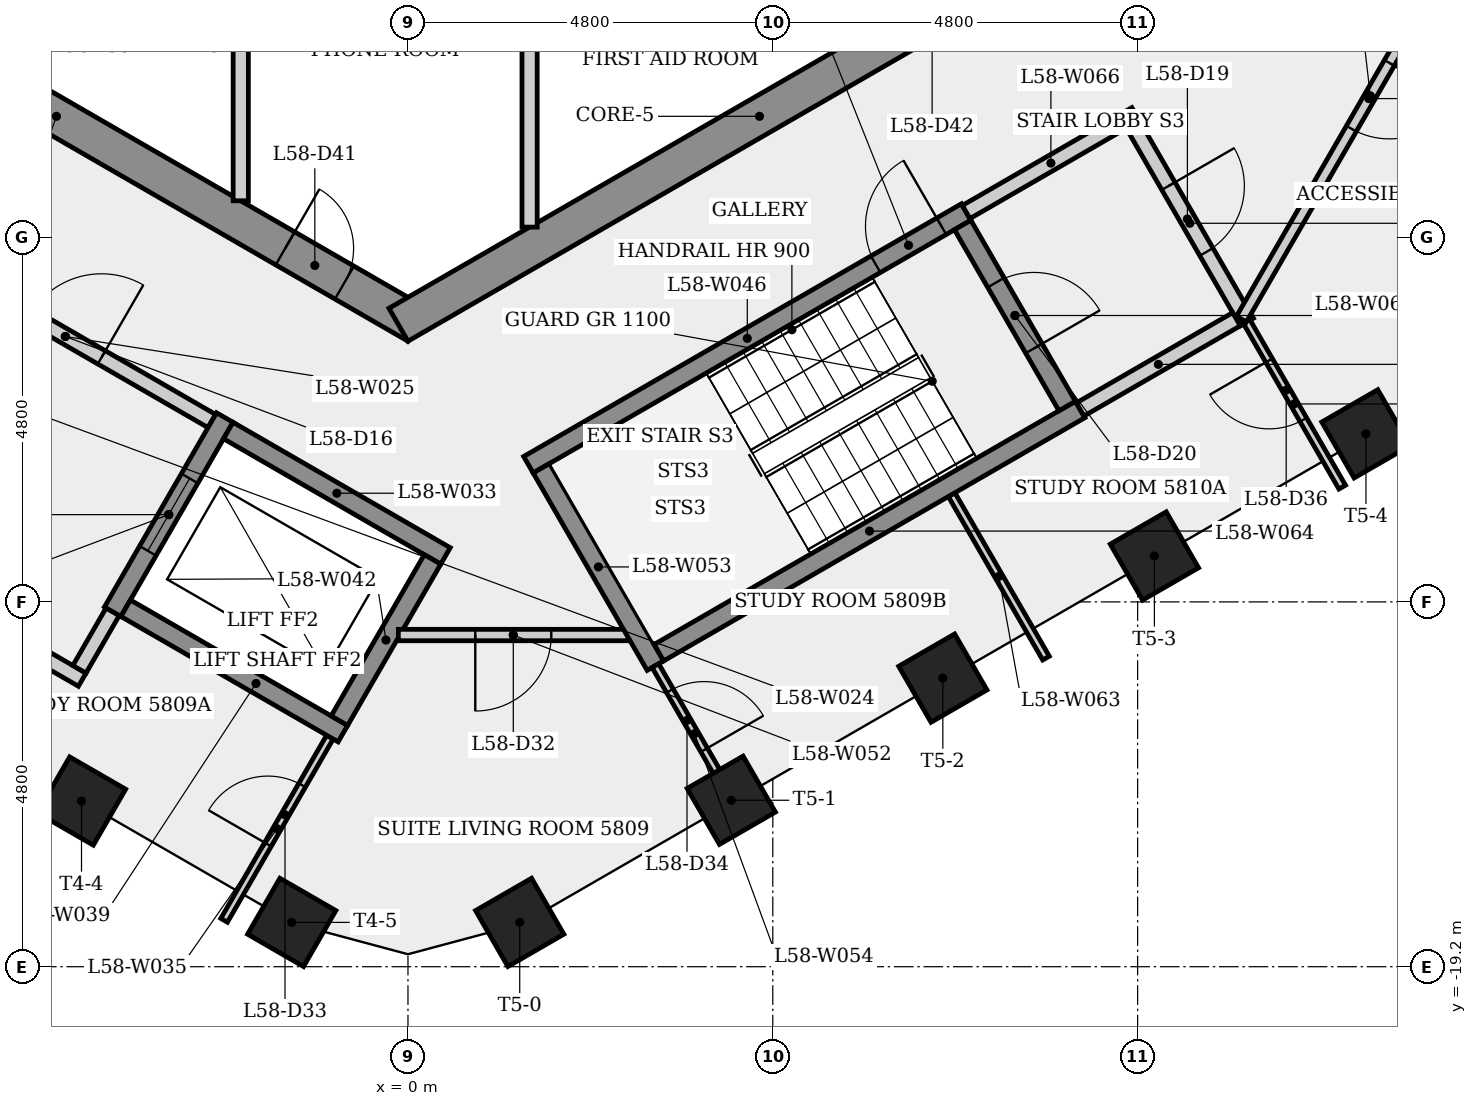
"""IFC4 building model, lengths in metres.
Left out: names, types, materials, properties, quantities, classifications, styles, units other than length and angle.
Written with IfcOpenShell. Run it as: python <this file> out.ifc"""

import sys

from ifc_helpers import new_model, si_unit, direction, frame, frame_2d, origin, origin_2d, place, context, subcontext, project, spatial, rectangle, extrude, element, fill, save


model = new_model("IFC4")
c1 = context("Model", 3, precision=1e-05, world=origin(), true_north=direction((0.0, 1.0)))
c2 = subcontext(c1, "Body", "Model", "MODEL_VIEW")
j1 = project(units=[si_unit("LENGTHUNIT", "METRE"), si_unit("PLANEANGLEUNIT", "RADIAN")], contexts=[c1])
p1 = place(None, origin())
s1 = spatial("IfcSite", under=j1, at=p1, CompositionType="ELEMENT")
p2 = place(p1, origin())
s2 = spatial("IfcBuilding", under=s1, at=p2, CompositionType="ELEMENT")
p3 = place(p2, frame((0.0, 0.0, 218.9)))
s3 = spatial("IfcBuildingStorey", under=s2, at=p3, CompositionType="ELEMENT", Elevation=218.9)
p4 = place(p3, frame((-9.375, -5.268, 0.0), z_axis=(0.0, 0.0, 1.0), x_axis=(0.866023993627, -0.500002442456, 0.0)))
e1 = element("IfcWall", 1, at=p4, inside=s3, PredefinedType="SHEAR", context=c2, shape_type="SweptSolid", body=[
    extrude(rectangle(XDim=10.97, YDim=0.5, at=frame_2d((5.485, 0.0))), origin(), (0.0, 0.0, 1.0), 3.4),
])
p5 = place(p4, frame((3.765, 0.0, 0.0)))
e2 = element("IfcOpeningElement", 2, at=p5, cuts=e1, PredefinedType="OPENING", context=c2, shape_type="SweptSolid", body=[
    extrude(rectangle(XDim=0.9, YDim=2.1, at=frame_2d((0.45, 1.05))), frame((0.0, 0.26, 0.0), z_axis=(0.0, -1.0, 0.0), x_axis=(1.0, 0.0, 0.0)), (0.0, 0.0, 1.0), 0.52),
])
p6 = place(p4, frame((8.96, 0.0, 0.0)))
e3 = element("IfcOpeningElement", 3, at=p6, cuts=e1, PredefinedType="OPENING", context=c2, shape_type="SweptSolid", body=[
    extrude(rectangle(XDim=0.9, YDim=2.1, at=frame_2d((0.45, 1.05))), frame((0.0, 0.26, 0.0), z_axis=(0.0, -1.0, 0.0), x_axis=(1.0, 0.0, 0.0)), (0.0, 0.0, 1.0), 0.52),
])
p7 = place(p3, frame((-0.125, -10.753, 0.0), z_axis=(0.0, 0.0, 1.0), x_axis=(0.866023993627, 0.500002442456, 0.0)))
e4 = element("IfcWall", 4, at=p7, inside=s3, PredefinedType="SHEAR", context=c2, shape_type="SweptSolid", body=[
    extrude(rectangle(XDim=10.97, YDim=0.5, at=frame_2d((5.485, 0.0))), origin(), (0.0, 0.0, 1.0), 3.4),
])
p8 = place(p7, frame((7.657, 0.0, 0.0)))
e5 = element("IfcOpeningElement", 5, at=p8, cuts=e4, PredefinedType="OPENING", context=c2, shape_type="SweptSolid", body=[
    extrude(rectangle(XDim=0.9, YDim=2.1, at=frame_2d((0.45, 1.05))), frame((0.0, 0.26, 0.0), z_axis=(0.0, -1.0, 0.0), x_axis=(1.0, 0.0, 0.0)), (0.0, 0.0, 1.0), 0.52),
])
for number, where, z_axis, x_axis in (
    (6, (-4.295, -17.02, 0.0), (0.0, 0.0, 1.0), (-0.5, -0.866, 0.0)),
    (7, (-1.53, -18.617, 0.0), (0.0, 0.0, 1.0), (-0.5, -0.866, 0.0)),
    (8, (1.47, -18.617, 0.0), (0.0, 0.0, 1.0), (0.5, -0.866, 0.0)),
    (9, (4.254, -17.01, 0.0), (0.0, 0.0, 1.0), (0.5, -0.866, 0.0)),
    (10, (7.037, -15.403, 0.0), (0.0, 0.0, 1.0), (0.5, -0.866, 0.0)),
    (11, (9.821, -13.796, 0.0), (0.0, 0.0, 1.0), (0.5, -0.866, 0.0)),
    (12, (12.604, -12.189, 0.0), (0.0, 0.0, 1.0), (0.5, -0.866, 0.0)),
):
    element("IfcColumn", number, at=place(p3, frame(where, z_axis=z_axis, x_axis=x_axis)), inside=s3, PredefinedType="COLUMN", context=c2, shape_type="SweptSolid", body=[
        extrude(rectangle(XDim=0.85, YDim=0.85, at=origin_2d()), origin(), (0.0, 0.0, 1.0), 3.4),
    ])
p9 = place(p3, frame((-8.356, -13.073, 0.0), z_axis=(0.0, 0.0, 1.0), x_axis=(0.866038532462, -0.499977259774, 0.0)))
e13 = element("IfcWall", 13, at=p9, inside=s3, PredefinedType="PARTITIONING", context=c2, shape_type="SweptSolid", body=[
    extrude(rectangle(XDim=4.7, YDim=0.2, at=frame_2d((2.35, 0.0))), origin(), (0.0, 0.0, 1.0), 3.05),
])
p10 = place(p3, frame((-6.435, -9.795, 0.0), z_axis=(0.0, 0.0, 1.0), x_axis=(0.866012907634, -0.500021643343, 0.0)))
e14 = element("IfcWall", 14, at=p10, inside=s3, PredefinedType="PARTITIONING", context=c2, shape_type="SweptSolid", body=[
    extrude(rectangle(XDim=4.45, YDim=0.2, at=frame_2d((2.225, 0.0))), origin(), (0.0, 0.0, 1.0), 3.05),
])
p11 = place(p10, frame((1.675, 0.0, 0.0)))
e15 = element("IfcOpeningElement", 15, at=p11, cuts=e14, PredefinedType="OPENING", context=c2, shape_type="SweptSolid", body=[
    extrude(rectangle(XDim=1.1, YDim=2.1, at=frame_2d((0.55, 1.05))), frame((0.0, 0.11, 0.0), z_axis=(0.0, -1.0, 0.0), x_axis=(1.0, 0.0, 0.0)), (0.0, 0.0, 1.0), 0.22),
])
p12 = place(p3, frame((-3.885, -14.529, 0.0), z_axis=(0.0, 0.0, 1.0), x_axis=(-0.499859285417, -0.866106630146, 0.0)))
e16 = element("IfcWall", 16, at=p12, inside=s3, PredefinedType="PARTITIONING", context=c2, shape_type="SweptSolid", body=[
    extrude(rectangle(XDim=0.875, YDim=0.2, at=frame_2d((0.438, 0.0))), origin(), (0.0, 0.0, 1.0), 3.05),
])
p13 = place(p3, frame((-2.41, -11.974, 0.0), z_axis=(0.0, 0.0, 1.0), x_axis=(-0.500001826776, -0.866024349092, 0.0)))
e17 = element("IfcWall", 17, at=p13, inside=s3, PredefinedType="SHEAR", context=c2, shape_type="SweptSolid", body=[
    extrude(rectangle(XDim=2.95, YDim=0.25, at=frame_2d((1.475, 0.0))), origin(), (0.0, 0.0, 1.0), 3.05),
])
p14 = place(p13, frame((0.925, 0.0, 0.0)))
e18 = element("IfcOpeningElement", 18, at=p14, cuts=e17, PredefinedType="OPENING", context=c2, shape_type="SweptSolid", body=[
    extrude(rectangle(XDim=1.1, YDim=2.1, at=frame_2d((0.55, 1.05))), frame((0.0, 0.135, 0.0), z_axis=(0.0, -1.0, 0.0), x_axis=(1.0, 0.0, 0.0)), (0.0, 0.0, 1.0), 0.27),
])
p15 = place(p3, frame((-2.364, -12.145, 0.0), z_axis=(0.0, 0.0, 1.0), x_axis=(0.866040211805, -0.499974350878, 0.0)))
e19 = element("IfcWall", 19, at=p15, inside=s3, PredefinedType="SHEAR", context=c2, shape_type="SweptSolid", body=[
    extrude(rectangle(XDim=3.3, YDim=0.25, at=frame_2d((1.65, 0.0))), origin(), (0.0, 0.0, 1.0), 3.05),
])
p16 = place(p3, frame((-2.419, -18.59, 0.0), z_axis=(0.0, 0.0, 1.0), x_axis=(0.500016013541, 0.866016158165, 0.0)))
e20 = element("IfcWall", 20, at=p16, inside=s3, PredefinedType="PARTITIONING", context=c2, shape_type="SweptSolid", body=[
    extrude(rectangle(XDim=2.784, YDim=0.1, at=frame_2d((1.392, 0.0))), origin(), (0.0, 0.0, 1.0), 3.05),
])
p17 = place(p16, frame((1.152, 0.0, 0.0)))
e21 = element("IfcOpeningElement", 21, at=p17, cuts=e20, PredefinedType="OPENING", context=c2, shape_type="SweptSolid", body=[
    extrude(rectangle(XDim=0.9, YDim=2.1, at=frame_2d((0.45, 1.05))), frame((0.0, 0.06, 0.0), z_axis=(0.0, -1.0, 0.0), x_axis=(1.0, 0.0, 0.0)), (0.0, 0.0, 1.0), 0.12),
])
p18 = place(p3, frame((-2.2, -5.25, 0.0), z_axis=(0.0, 0.0, 1.0), x_axis=(0.0, -1.0, 0.0)))
e22 = element("IfcWall", 22, at=p18, inside=s3, PredefinedType="PARTITIONING", context=c2, shape_type="SweptSolid", body=[
    extrude(rectangle(XDim=3.872, YDim=0.2, at=frame_2d((1.936, 0.0))), origin(), (0.0, 0.0, 1.0), 3.05),
])
p19 = place(p3, frame((-0.856, -16.133, 0.0), z_axis=(0.0, 0.0, 1.0), x_axis=(-0.866021716278, 0.500006386895, 0.0)))
e23 = element("IfcWall", 23, at=p19, inside=s3, PredefinedType="SHEAR", context=c2, shape_type="SweptSolid", body=[
    extrude(rectangle(XDim=3.3, YDim=0.25, at=frame_2d((1.65, 0.0))), origin(), (0.0, 0.0, 1.0), 3.05),
])
p20 = place(p3, frame((-0.902, -15.962, 0.0), z_axis=(0.0, 0.0, 1.0), x_axis=(0.500061746146, 0.865989751695, 0.0)))
e24 = element("IfcWall", 24, at=p20, inside=s3, PredefinedType="SHEAR", context=c2, shape_type="SweptSolid", body=[
    extrude(rectangle(XDim=2.45, YDim=0.25, at=frame_2d((1.225, 0.0))), origin(), (0.0, 0.0, 1.0), 3.4),
])
p21 = place(p3, frame((1.6, -5.25, 0.0), z_axis=(0.0, 0.0, 1.0), x_axis=(0.0, -1.0, 0.0)))
e25 = element("IfcWall", 25, at=p21, inside=s3, PredefinedType="PARTITIONING", context=c2, shape_type="SweptSolid", body=[
    extrude(rectangle(XDim=4.219, YDim=0.2, at=frame_2d((2.109, 0.0))), origin(), (0.0, 0.0, 1.0), 3.05),
])
p22 = place(p3, frame((1.585, -12.595, 0.0), z_axis=(0.0, 0.0, 1.0), x_axis=(0.866036417653, 0.499980922934, 0.0)))
e26 = element("IfcWall", 26, at=p22, inside=s3, PredefinedType="SHEAR", context=c2, shape_type="SweptSolid", body=[
    extrude(rectangle(XDim=6.65, YDim=0.25, at=frame_2d((3.325, 0.0))), origin(), (0.0, 0.0, 1.0), 3.05),
])
p23 = place(p22, frame((5.275, 0.0, 0.0)))
e27 = element("IfcOpeningElement", 27, at=p23, cuts=e26, PredefinedType="OPENING", context=c2, shape_type="SweptSolid", body=[
    extrude(rectangle(XDim=1.0, YDim=2.1, at=frame_2d((0.5, 1.05))), frame((0.0, 0.135, 0.0), z_axis=(0.0, -1.0, 0.0), x_axis=(1.0, 0.0, 0.0)), (0.0, 0.0, 1.0), 0.27),
])
p24 = place(p3, frame((2.898, -14.836, 0.0), z_axis=(0.0, 0.0, 1.0), x_axis=(-1.0, 0.0, 0.0)))
e28 = element("IfcWall", 28, at=p24, inside=s3, PredefinedType="PARTITIONING", context=c2, shape_type="SweptSolid", body=[
    extrude(rectangle(XDim=3.025, YDim=0.15, at=frame_2d((1.512, 0.0))), origin(), (0.0, 0.0, 1.0), 3.05),
])
p25 = place(p24, frame((1.012, 0.0, 0.0)))
e29 = element("IfcOpeningElement", 29, at=p25, cuts=e28, PredefinedType="OPENING", context=c2, shape_type="SweptSolid", body=[
    extrude(rectangle(XDim=1.0, YDim=2.1, at=frame_2d((0.5, 1.05))), frame((0.0, 0.085, 0.0), z_axis=(0.0, -1.0, 0.0), x_axis=(1.0, 0.0, 0.0)), (0.0, 0.0, 1.0), 0.17),
])
p26 = place(p3, frame((1.756, -12.641, 0.0), z_axis=(0.0, 0.0, 1.0), x_axis=(0.50002537861, -0.866010750942, 0.0)))
e30 = element("IfcWall", 30, at=p26, inside=s3, PredefinedType="SHEAR", context=c2, shape_type="SweptSolid", body=[
    extrude(rectangle(XDim=3.0, YDim=0.25, at=frame_2d((1.5, 0.0))), origin(), (0.0, 0.0, 1.0), 3.05),
])
p27 = place(p3, frame((3.256, -15.239, 0.0), z_axis=(0.0, 0.0, 1.0), x_axis=(0.500009360108, -0.866019999656, 0.0)))
e31 = element("IfcWall", 31, at=p27, inside=s3, PredefinedType="PARTITIONING", context=c2, shape_type="SweptSolid", body=[
    extrude(rectangle(XDim=2.062, YDim=0.1, at=frame_2d((1.031, 0.0))), origin(), (0.0, 0.0, 1.0), 3.05),
])
p28 = place(p27, frame((0.381, 0.0, 0.0)))
e32 = element("IfcOpeningElement", 32, at=p28, cuts=e31, PredefinedType="OPENING", context=c2, shape_type="SweptSolid", body=[
    extrude(rectangle(XDim=0.9, YDim=2.1, at=frame_2d((0.45, 1.05))), frame((0.0, 0.06, 0.0), z_axis=(0.0, -1.0, 0.0), x_axis=(1.0, 0.0, 0.0)), (0.0, 0.0, 1.0), 0.12),
])
p29 = place(p3, frame((7.153, -12.989, 0.0), z_axis=(0.0, 0.0, 1.0), x_axis=(0.499966389646, -0.866044807862, 0.0)))
e33 = element("IfcWall", 33, at=p29, inside=s3, PredefinedType="PARTITIONING", context=c2, shape_type="SweptSolid", body=[
    extrude(rectangle(XDim=2.484, YDim=0.1, at=frame_2d((1.242, 0.0))), origin(), (0.0, 0.0, 1.0), 3.05),
])
p30 = place(p3, frame((3.301, -15.068, 0.0), z_axis=(0.0, 0.0, 1.0), x_axis=(0.866035036182, 0.499983315828, 0.0)))
e34 = element("IfcWall", 34, at=p30, inside=s3, PredefinedType="SHEAR", context=c2, shape_type="SweptSolid", body=[
    extrude(rectangle(XDim=6.4, YDim=0.25, at=frame_2d((3.2, 0.0))), origin(), (0.0, 0.0, 1.0), 3.05),
])
p31 = place(p3, frame((7.298, -9.441, 0.0), z_axis=(0.0, 0.0, 1.0), x_axis=(0.500034990121, -0.866005201286, 0.0)))
e35 = element("IfcWall", 35, at=p31, inside=s3, PredefinedType="SHEAR", context=c2, shape_type="SweptSolid", body=[
    extrude(rectangle(XDim=2.75, YDim=0.25, at=frame_2d((1.375, 0.0))), origin(), (0.0, 0.0, 1.0), 3.05),
])
p32 = place(p31, frame((0.875, 0.0, 0.0)))
e36 = element("IfcOpeningElement", 36, at=p32, cuts=e35, PredefinedType="OPENING", context=c2, shape_type="SweptSolid", body=[
    extrude(rectangle(XDim=1.0, YDim=2.1, at=frame_2d((0.5, 1.05))), frame((0.0, 0.135, 0.0), z_axis=(0.0, -1.0, 0.0), x_axis=(1.0, 0.0, 0.0)), (0.0, 0.0, 1.0), 0.27),
])
p33 = place(p3, frame((7.344, -9.27, 0.0), z_axis=(0.0, 0.0, 1.0), x_axis=(0.866005588531, 0.500034319456, 0.0)))
e37 = element("IfcWall", 37, at=p33, inside=s3, PredefinedType="PARTITIONING", context=c2, shape_type="SweptSolid", body=[
    extrude(rectangle(XDim=2.575, YDim=0.2, at=frame_2d((1.288, 0.0))), origin(), (0.0, 0.0, 1.0), 3.05),
])
p34 = place(p3, frame((9.537, -8.119, 0.0), z_axis=(0.0, 0.0, 1.0), x_axis=(0.499990139034, -0.866031096941, 0.0)))
e38 = element("IfcWall", 38, at=p34, inside=s3, PredefinedType="PARTITIONING", context=c2, shape_type="SweptSolid", body=[
    extrude(rectangle(XDim=3.0, YDim=0.2, at=frame_2d((1.5, 0.0))), origin(), (0.0, 0.0, 1.0), 3.05),
])
p35 = place(p34, frame((0.935, 0.0, 0.0)))
e39 = element("IfcOpeningElement", 39, at=p35, cuts=e38, PredefinedType="OPENING", context=c2, shape_type="SweptSolid", body=[
    extrude(rectangle(XDim=1.0, YDim=2.1, at=frame_2d((0.5, 1.05))), frame((0.0, 0.11, 0.0), z_axis=(0.0, -1.0, 0.0), x_axis=(1.0, 0.0, 0.0)), (0.0, 0.0, 1.0), 0.22),
])
p36 = place(p3, frame((10.901, -10.681, 0.0), z_axis=(0.0, 0.0, 1.0), x_axis=(-0.866007538022, -0.500030943131, 0.0)))
e40 = element("IfcWall", 40, at=p36, inside=s3, PredefinedType="PARTITIONING", context=c2, shape_type="SweptSolid", body=[
    extrude(rectangle(XDim=2.375, YDim=0.2, at=frame_2d((1.188, 0.0))), origin(), (0.0, 0.0, 1.0), 3.05),
])
p37 = place(p3, frame((12.292, -12.89, 0.0), z_axis=(0.0, 0.0, 1.0), x_axis=(-0.500003972934, 0.866023109998, 0.0)))
e41 = element("IfcWall", 41, at=p37, inside=s3, PredefinedType="PARTITIONING", context=c2, shape_type="SweptSolid", body=[
    extrude(rectangle(XDim=2.527, YDim=0.1, at=frame_2d((1.264, 0.0))), origin(), (0.0, 0.0, 1.0), 3.05),
])
p38 = place(p37, frame((1.024, 0.0, 0.0)))
e42 = element("IfcOpeningElement", 42, at=p38, cuts=e41, PredefinedType="OPENING", context=c2, shape_type="SweptSolid", body=[
    extrude(rectangle(XDim=0.9, YDim=2.1, at=frame_2d((0.45, 1.05))), frame((0.0, 0.06, 0.0), z_axis=(0.0, -1.0, 0.0), x_axis=(1.0, 0.0, 0.0)), (0.0, 0.0, 1.0), 0.12),
])
p39 = place(p3, frame((14.316, -4.876, 0.0), z_axis=(0.0, 0.0, 1.0), x_axis=(-0.499994719637, -0.866028452382, 0.0)))
e43 = element("IfcWall", 43, at=p39, inside=s3, PredefinedType="PARTITIONING", context=c2, shape_type="SweptSolid", body=[
    extrude(rectangle(XDim=6.701, YDim=0.15, at=frame_2d((3.351, 0.0))), origin(), (0.0, 0.0, 1.0), 3.05),
])
p40 = place(p39, frame((2.808, 0.0, 0.0)))
e44 = element("IfcOpeningElement", 44, at=p40, cuts=e43, PredefinedType="OPENING", context=c2, shape_type="SweptSolid", body=[
    extrude(rectangle(XDim=1.0, YDim=2.1, at=frame_2d((0.5, 1.05))), frame((0.0, 0.085, 0.0), z_axis=(0.0, -1.0, 0.0), x_axis=(1.0, 0.0, 0.0)), (0.0, 0.0, 1.0), 0.17),
])
p41 = place(p11, origin())
e45 = element("IfcDoor", 45, at=p41, inside=s3, OperationType="SINGLE_SWING_RIGHT", PredefinedType="DOOR", context=c2, shape_type="SweptSolid", body=[
    extrude(rectangle(XDim=1.1, YDim=2.1, at=frame_2d((0.55, 1.05))), frame((0.0, 0.025, 0.0), z_axis=(0.0, -1.0, 0.0), x_axis=(1.0, 0.0, 0.0)), (0.0, 0.0, 1.0), 0.05),
])
fill(e15, e45)
p42 = place(p14, origin())
e46 = element("IfcDoor", 46, at=p42, inside=s3, OperationType="SLIDING_TO_LEFT", PredefinedType="DOOR", context=c2, shape_type="SweptSolid", body=[
    extrude(rectangle(XDim=1.1, YDim=2.1, at=frame_2d((0.55, 1.05))), frame((0.0, 0.025, 0.0), z_axis=(0.0, -1.0, 0.0), x_axis=(1.0, 0.0, 0.0)), (0.0, 0.0, 1.0), 0.05),
])
fill(e18, e46)
p43 = place(p23, origin())
e47 = element("IfcDoor", 47, at=p43, inside=s3, OperationType="SINGLE_SWING_RIGHT", PredefinedType="DOOR", context=c2, shape_type="SweptSolid", body=[
    extrude(rectangle(XDim=1.0, YDim=2.1, at=frame_2d((0.5, 1.05))), frame((0.0, 0.025, 0.0), z_axis=(0.0, -1.0, 0.0), x_axis=(1.0, 0.0, 0.0)), (0.0, 0.0, 1.0), 0.05),
])
fill(e27, e47)
p44 = place(p35, origin())
e48 = element("IfcDoor", 48, at=p44, inside=s3, OperationType="SINGLE_SWING_LEFT", PredefinedType="DOOR", context=c2, shape_type="SweptSolid", body=[
    extrude(rectangle(XDim=1.0, YDim=2.1, at=frame_2d((0.5, 1.05))), frame((0.0, 0.025, 0.0), z_axis=(0.0, -1.0, 0.0), x_axis=(1.0, 0.0, 0.0)), (0.0, 0.0, 1.0), 0.05),
])
fill(e39, e48)
p45 = place(p32, origin())
e49 = element("IfcDoor", 49, at=p45, inside=s3, OperationType="SINGLE_SWING_RIGHT", PredefinedType="DOOR", context=c2, shape_type="SweptSolid", body=[
    extrude(rectangle(XDim=1.0, YDim=2.1, at=frame_2d((0.5, 1.05))), frame((0.0, 0.025, 0.0), z_axis=(0.0, -1.0, 0.0), x_axis=(1.0, 0.0, 0.0)), (0.0, 0.0, 1.0), 0.05),
])
fill(e36, e49)
p46 = place(p25, origin())
e50 = element("IfcDoor", 50, at=p46, inside=s3, OperationType="SINGLE_SWING_RIGHT", PredefinedType="DOOR", context=c2, shape_type="SweptSolid", body=[
    extrude(rectangle(XDim=1.0, YDim=2.1, at=frame_2d((0.5, 1.05))), frame((0.0, 0.025, 0.0), z_axis=(0.0, -1.0, 0.0), x_axis=(1.0, 0.0, 0.0)), (0.0, 0.0, 1.0), 0.05),
])
fill(e29, e50)
p47 = place(p17, origin())
e51 = element("IfcDoor", 51, at=p47, inside=s3, OperationType="SINGLE_SWING_LEFT", PredefinedType="DOOR", context=c2, shape_type="SweptSolid", body=[
    extrude(rectangle(XDim=0.9, YDim=2.1, at=frame_2d((0.45, 1.05))), frame((0.0, 0.025, 0.0), z_axis=(0.0, -1.0, 0.0), x_axis=(1.0, 0.0, 0.0)), (0.0, 0.0, 1.0), 0.05),
])
fill(e21, e51)
p48 = place(p28, origin())
e52 = element("IfcDoor", 52, at=p48, inside=s3, OperationType="SINGLE_SWING_RIGHT", PredefinedType="DOOR", context=c2, shape_type="SweptSolid", body=[
    extrude(rectangle(XDim=0.9, YDim=2.1, at=frame_2d((0.45, 1.05))), frame((0.0, 0.025, 0.0), z_axis=(0.0, -1.0, 0.0), x_axis=(1.0, 0.0, 0.0)), (0.0, 0.0, 1.0), 0.05),
])
fill(e32, e52)
p49 = place(p40, origin())
e53 = element("IfcDoor", 53, at=p49, inside=s3, OperationType="SINGLE_SWING_LEFT", PredefinedType="DOOR", context=c2, shape_type="SweptSolid", body=[
    extrude(rectangle(XDim=1.0, YDim=2.1, at=frame_2d((0.5, 1.05))), frame((0.0, 0.025, 0.0), z_axis=(0.0, -1.0, 0.0), x_axis=(1.0, 0.0, 0.0)), (0.0, 0.0, 1.0), 0.05),
])
fill(e44, e53)
p50 = place(p38, origin())
e54 = element("IfcDoor", 54, at=p50, inside=s3, OperationType="SINGLE_SWING_RIGHT", PredefinedType="DOOR", context=c2, shape_type="SweptSolid", body=[
    extrude(rectangle(XDim=0.9, YDim=2.1, at=frame_2d((0.45, 1.05))), frame((0.0, 0.025, 0.0), z_axis=(0.0, -1.0, 0.0), x_axis=(1.0, 0.0, 0.0)), (0.0, 0.0, 1.0), 0.05),
])
fill(e42, e54)
p51 = place(p6, origin())
e55 = element("IfcDoor", 55, at=p51, inside=s3, OperationType="SINGLE_SWING_LEFT", PredefinedType="DOOR", context=c2, shape_type="SweptSolid", body=[
    extrude(rectangle(XDim=0.9, YDim=2.1, at=frame_2d((0.45, 1.05))), frame((0.0, 0.025, 0.0), z_axis=(0.0, -1.0, 0.0), x_axis=(1.0, 0.0, 0.0)), (0.0, 0.0, 1.0), 0.05),
])
fill(e3, e55)
save(model, sys.argv[1])
